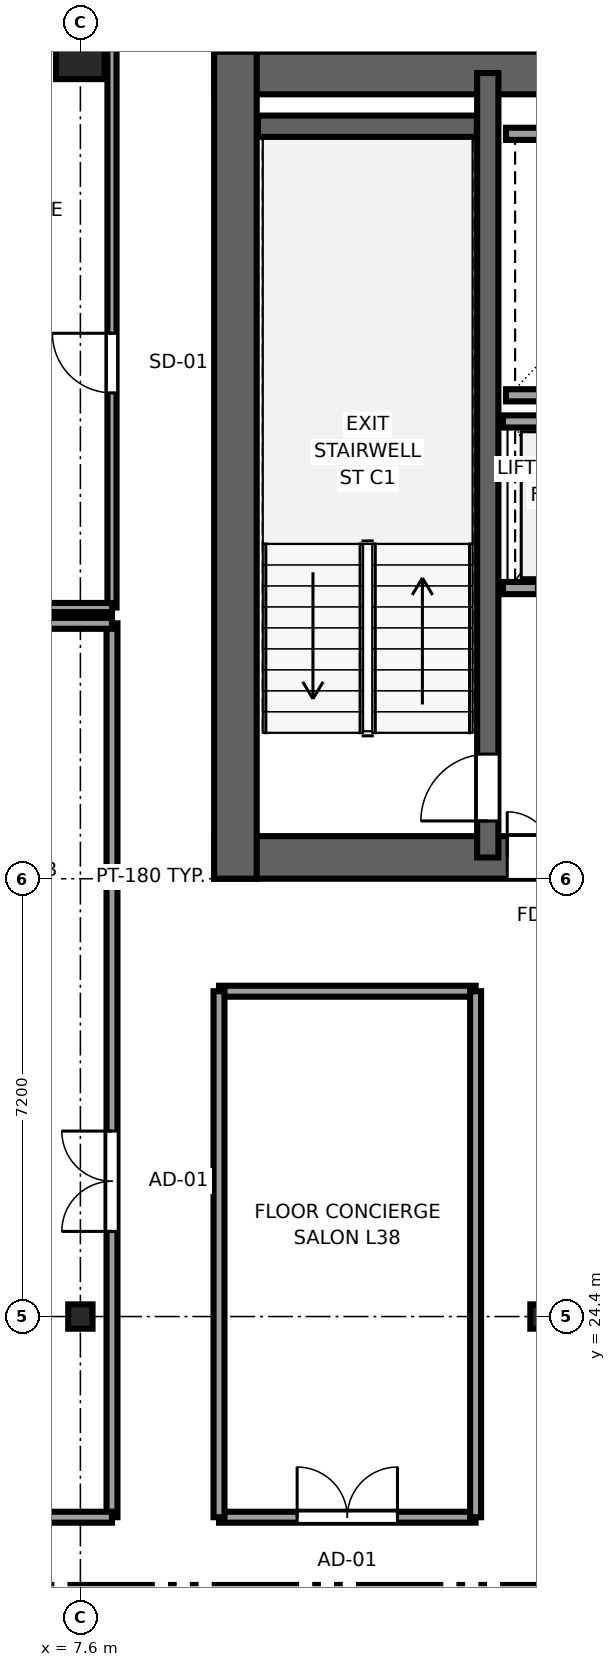
"""IFC4 building model, lengths in metres.
Left out: names, types, materials, properties, quantities, classifications, styles, units other than length and angle.
Written with IfcOpenShell. Run it as: python <this file> out.ifc"""

import sys

from ifc_helpers import new_model, si_unit, direction, frame, frame_2d, origin, origin_2d, place, context, subcontext, project, spatial, rectangle, i_section, extrude, source, transform, mapped, element, fill, save


model = new_model("IFC4")
c1 = context("Model", 3, precision=1e-05, world=origin(), true_north=direction((0.0, 1.0)))
c2 = subcontext(c1, "Body", "Model", "MODEL_VIEW")
j1 = project(units=[si_unit("LENGTHUNIT", "METRE"), si_unit("PLANEANGLEUNIT", "RADIAN")], contexts=[c1])
p1 = place(None, origin())
s1 = spatial("IfcSite", under=j1, at=p1, CompositionType="ELEMENT")
p2 = place(p1, origin())
s2 = spatial("IfcBuilding", under=s1, at=p2, CompositionType="ELEMENT")
p3 = place(p2, frame((0.0, 0.0, 147.05)))
s3 = spatial("IfcBuildingStorey", under=s2, at=p3, CompositionType="ELEMENT", Elevation=147.05)
p4 = place(p3, frame((9.8, 31.95, 0.0), z_axis=(0.0, 0.0, 1.0), x_axis=(1.0, 0.0, 0.0)))
e1 = element("IfcWall", 1, at=p4, inside=s3, PredefinedType="SHEAR", context=c2, shape_type="SweptSolid", body=[
    extrude(rectangle(XDim=26.4, YDim=0.7, at=frame_2d((13.2, 0.0))), origin(), (0.0, 0.0, 1.0), 3.55),
])
p5 = place(p4, frame((6.32, 0.0, 0.0), z_axis=(0.0, 0.0, 1.0), x_axis=(-1.0, 0.0, 0.0)))
e2 = element("IfcOpeningElement", 2, at=p5, cuts=e1, PredefinedType="OPENING", context=c2, shape_type="SweptSolid", body=[
    extrude(rectangle(XDim=1.5, YDim=2.04, at=frame_2d((0.75, 1.02))), frame((0.0, 0.36, 0.0), z_axis=(0.0, -1.0, 0.0), x_axis=(1.0, 0.0, 0.0)), (0.0, 0.0, 1.0), 0.72),
])
p6 = place(p4, frame((13.95, 0.0, 0.0), z_axis=(0.0, 0.0, 1.0), x_axis=(-1.0, 0.0, 0.0)))
e3 = element("IfcOpeningElement", 3, at=p6, cuts=e1, PredefinedType="OPENING", context=c2, shape_type="SweptSolid", body=[
    extrude(rectangle(XDim=1.5, YDim=2.04, at=frame_2d((0.75, 1.02))), frame((0.0, 0.36, 0.0), z_axis=(0.0, -1.0, 0.0), x_axis=(1.0, 0.0, 0.0)), (0.0, 0.0, 1.0), 0.72),
])
p7 = place(p4, frame((21.58, 0.0, 0.0), z_axis=(0.0, 0.0, 1.0), x_axis=(-1.0, 0.0, 0.0)))
e4 = element("IfcOpeningElement", 4, at=p7, cuts=e1, PredefinedType="OPENING", context=c2, shape_type="SweptSolid", body=[
    extrude(rectangle(XDim=1.5, YDim=2.04, at=frame_2d((0.75, 1.02))), frame((0.0, 0.36, 0.0), z_axis=(0.0, -1.0, 0.0), x_axis=(1.0, 0.0, 0.0)), (0.0, 0.0, 1.0), 0.72),
])
p8 = place(p4, frame((8.37, 0.0, 0.0), z_axis=(0.0, 0.0, 1.0), x_axis=(-1.0, 0.0, 0.0)))
e5 = element("IfcOpeningElement", 5, at=p8, cuts=e1, PredefinedType="OPENING", context=c2, shape_type="SweptSolid", body=[
    extrude(rectangle(XDim=0.82, YDim=2.01, at=frame_2d((0.41, 1.005))), frame((0.0, 0.36, 0.0), z_axis=(0.0, -1.0, 0.0), x_axis=(1.0, 0.0, 0.0)), (0.0, 0.0, 1.0), 0.72),
])
p9 = place(p4, frame((18.87, 0.0, 0.0), z_axis=(0.0, 0.0, 1.0), x_axis=(-1.0, 0.0, 0.0)))
e6 = element("IfcOpeningElement", 6, at=p9, cuts=e1, PredefinedType="OPENING", context=c2, shape_type="SweptSolid", body=[
    extrude(rectangle(XDim=0.82, YDim=2.01, at=frame_2d((0.41, 1.005))), frame((0.0, 0.36, 0.0), z_axis=(0.0, -1.0, 0.0), x_axis=(1.0, 0.0, 0.0)), (0.0, 0.0, 1.0), 0.72),
])
p10 = place(p3, frame((9.8, 44.85, 0.0), z_axis=(0.0, 0.0, 1.0), x_axis=(1.0, 0.0, 0.0)))
e7 = element("IfcWall", 7, at=p10, inside=s3, PredefinedType="SHEAR", context=c2, shape_type="SweptSolid", body=[
    extrude(rectangle(XDim=26.4, YDim=0.7, at=frame_2d((13.2, 0.0))), origin(), (0.0, 0.0, 1.0), 3.55),
])
p11 = place(p3, frame((10.15, 31.6, 0.0), z_axis=(0.0, 0.0, 1.0), x_axis=(0.0, 1.0, 0.0)))
e8 = element("IfcWall", 8, at=p11, inside=s3, PredefinedType="SHEAR", context=c2, shape_type="SweptSolid", body=[
    extrude(rectangle(XDim=13.6, YDim=0.7, at=frame_2d((6.8, 0.0))), origin(), (0.0, 0.0, 1.0), 3.55),
])
p12 = place(p3, frame((14.3, 31.95, 0.0), z_axis=(0.0, 0.0, 1.0), x_axis=(0.0, 1.0, 0.0)))
e9 = element("IfcWall", 9, at=p12, inside=s3, PredefinedType="SHEAR", context=c2, shape_type="SweptSolid", body=[
    extrude(rectangle(XDim=12.9, YDim=0.35, at=frame_2d((6.45, 0.0))), origin(), (0.0, 0.0, 1.0), 3.55),
])
p13 = place(p12, frame((0.6, 0.0, 0.0)))
e10 = element("IfcOpeningElement", 10, at=p13, cuts=e9, PredefinedType="OPENING", context=c2, shape_type="SweptSolid", body=[
    extrude(rectangle(XDim=1.1, YDim=2.12, at=frame_2d((0.55, 1.06))), frame((0.0, 0.185, 0.0), z_axis=(0.0, -1.0, 0.0), x_axis=(1.0, 0.0, 0.0)), (0.0, 0.0, 1.0), 0.37),
])
p14 = place(p3, frame((10.52, 43.975, 0.0), z_axis=(0.0, 0.0, 1.0), x_axis=(1.0, 0.0, 0.0)))
e11 = element("IfcWall", 11, at=p14, inside=s3, PredefinedType="SHEAR", context=c2, shape_type="SweptSolid", body=[
    extrude(rectangle(XDim=3.6, YDim=0.35, at=frame_2d((1.8, 0.0))), origin(), (0.0, 0.0, 1.0), 3.55),
])
m1 = source(origin(), c2, "Body", "SweptSolid", [
    extrude(i_section(OverallWidth=0.4, OverallDepth=0.4, WebThickness=0.02, FlangeThickness=0.035, at=origin_2d()), origin(), (0.0, 0.0, 1.0), 3.55),
])
for number, where, z_axis, x_axis in (
    (12, (7.6, 24.4, 0.0), (0.0, 0.0, 1.0), (1.0, 0.0, 0.0)),
    (13, (15.2, 24.4, 0.0), (0.0, 0.0, 1.0), (1.0, 0.0, 0.0)),
):
    element("IfcColumn", number, at=place(p3, frame(where, z_axis=z_axis, x_axis=x_axis)), inside=s3, PredefinedType="COLUMN", context=c2, shape_type="MappedRepresentation", body=[
        mapped(m1, transform((0.0, 0.0, 0.0), x_axis=(1.0, 0.0, 0.0), y_axis=(0.0, 1.0, 0.0), z_axis=(0.0, 0.0, 1.0), scale=1.0)),
    ])
m2 = source(origin(), c2, "Body", "SweptSolid", [
    extrude(rectangle(XDim=0.8, YDim=0.8, at=origin_2d()), origin(), (0.0, 0.0, 1.0), 3.55),
])
p15 = place(p3, frame((7.6, 45.15, 0.0), z_axis=(0.0, 0.0, 1.0), x_axis=(1.0, 0.0, 0.0)))
e14 = element("IfcColumn", 14, at=p15, inside=s3, PredefinedType="COLUMN", context=c2, shape_type="MappedRepresentation", body=[
    mapped(m2, transform((0.0, 0.0, 0.0), x_axis=(1.0, 0.0, 0.0), y_axis=(0.0, 1.0, 0.0), z_axis=(0.0, 0.0, 1.0), scale=1.0)),
])
for number, where, z_axis, x_axis in (
    (15, (14.6, 39.55, 0.0), (0.0, 0.0, 1.0), (1.0, 0.0, 0.0)),
    (16, (14.6, 43.85, 0.0), (0.0, 0.0, 1.0), (1.0, 0.0, 0.0)),
):
    element("IfcWall", number, at=place(p3, frame(where, z_axis=z_axis, x_axis=x_axis)), inside=s3, PredefinedType="SOLIDWALL", context=c2, shape_type="SweptSolid", body=[
        extrude(rectangle(XDim=4.1, YDim=0.2, at=frame_2d((2.05, 0.0))), origin(), (0.0, 0.0, 1.0), 3.37),
    ])
p16 = place(p3, frame((14.55, 36.38, 0.0), z_axis=(0.0, 0.0, 1.0), x_axis=(1.0, 0.0, 0.0)))
e17 = element("IfcWall", 17, at=p16, inside=s3, PredefinedType="SOLIDWALL", context=c2, shape_type="SweptSolid", body=[
    extrude(rectangle(XDim=4.075, YDim=0.2, at=frame_2d((2.038, 0.0))), origin(), (0.0, 0.0, 1.0), 3.37),
])
p17 = place(p16, frame((0.55, 0.0, 0.0)))
e18 = element("IfcOpeningElement", 18, at=p17, cuts=e17, PredefinedType="OPENING", context=c2, shape_type="SweptSolid", body=[
    extrude(rectangle(XDim=1.1, YDim=2.12, at=frame_2d((0.55, 1.06))), frame((0.0, 0.11, 0.0), z_axis=(0.0, -1.0, 0.0), x_axis=(1.0, 0.0, 0.0)), (0.0, 0.0, 1.0), 0.22),
])
p18 = place(p16, frame((2.45, 0.0, 0.0)))
e19 = element("IfcOpeningElement", 19, at=p18, cuts=e17, PredefinedType="OPENING", context=c2, shape_type="SweptSolid", body=[
    extrude(rectangle(XDim=1.1, YDim=2.12, at=frame_2d((0.55, 1.06))), frame((0.0, 0.11, 0.0), z_axis=(0.0, -1.0, 0.0), x_axis=(1.0, 0.0, 0.0)), (0.0, 0.0, 1.0), 0.22),
])
p19 = place(p3, frame((14.55, 39.12, 0.0), z_axis=(0.0, 0.0, 1.0), x_axis=(1.0, 0.0, 0.0)))
e20 = element("IfcWall", 20, at=p19, inside=s3, PredefinedType="SOLIDWALL", context=c2, shape_type="SweptSolid", body=[
    extrude(rectangle(XDim=4.075, YDim=0.2, at=frame_2d((2.038, 0.0))), origin(), (0.0, 0.0, 1.0), 3.37),
])
p20 = place(p3, frame((8.12, 21.1, 0.0), z_axis=(0.0, 0.0, 1.0), x_axis=(0.0, 1.0, 0.0)))
e21 = element("IfcWall", 21, at=p20, inside=s3, PredefinedType="PARTITIONING", context=c2, shape_type="SweptSolid", body=[
    extrude(rectangle(XDim=14.7, YDim=0.18, at=frame_2d((7.35, 0.0))), origin(), (0.0, 0.0, 1.0), 3.37),
])
p21 = place(p20, frame((4.7, 0.0, 0.0)))
e22 = element("IfcOpeningElement", 22, at=p21, cuts=e21, PredefinedType="OPENING", context=c2, shape_type="SweptSolid", body=[
    extrude(rectangle(XDim=1.65, YDim=2.15, at=frame_2d((0.825, 1.075))), frame((0.0, 0.1, 0.0), z_axis=(0.0, -1.0, 0.0), x_axis=(1.0, 0.0, 0.0)), (0.0, 0.0, 1.0), 0.2),
])
for number, where, z_axis, x_axis in (
    (23, (3.005, 21.1, 0.0), (0.0, 0.0, 1.0), (1.0, 0.0, 0.0)),
    (24, (3.005, 35.8, 0.0), (0.0, 0.0, 1.0), (1.0, 0.0, 0.0)),
):
    element("IfcWall", number, at=place(p3, frame(where, z_axis=z_axis, x_axis=x_axis)), inside=s3, PredefinedType="PARTITIONING", context=c2, shape_type="SweptSolid", body=[
        extrude(rectangle(XDim=5.115, YDim=0.18, at=frame_2d((2.558, 0.0))), origin(), (0.0, 0.0, 1.0), 3.37),
    ])
p22 = place(p3, frame((8.12, 36.06, 0.0), z_axis=(0.0, 0.0, 1.0), x_axis=(0.0, 1.0, 0.0)))
e25 = element("IfcWall", 25, at=p22, inside=s3, PredefinedType="PARTITIONING", context=c2, shape_type="SweptSolid", body=[
    extrude(rectangle(XDim=9.535, YDim=0.15, at=frame_2d((4.768, 0.0))), origin(), (0.0, 0.0, 1.0), 3.37),
])
p23 = place(p22, frame((3.53, 0.0, 0.0)))
e26 = element("IfcOpeningElement", 26, at=p23, cuts=e25, PredefinedType="OPENING", context=c2, shape_type="SweptSolid", body=[
    extrude(rectangle(XDim=0.98, YDim=2.12, at=frame_2d((0.49, 1.06))), frame((0.0, 0.085, 0.0), z_axis=(0.0, -1.0, 0.0), x_axis=(1.0, 0.0, 0.0)), (0.0, 0.0, 1.0), 0.17),
])
p24 = place(p3, frame((5.07, 36.06, 0.0), z_axis=(0.0, 0.0, 1.0), x_axis=(1.0, 0.0, 0.0)))
e27 = element("IfcWall", 27, at=p24, inside=s3, PredefinedType="PARTITIONING", context=c2, shape_type="SweptSolid", body=[
    extrude(rectangle(XDim=3.05, YDim=0.15, at=frame_2d((1.525, 0.0))), origin(), (0.0, 0.0, 1.0), 3.37),
])
p25 = place(p3, frame((9.88, 21.1, 0.0), z_axis=(0.0, 0.0, 1.0), x_axis=(1.0, 0.0, 0.0)))
e28 = element("IfcWall", 28, at=p25, inside=s3, PredefinedType="PARTITIONING", context=c2, shape_type="SweptSolid", body=[
    extrude(rectangle(XDim=4.22, YDim=0.18, at=frame_2d((2.11, 0.0))), origin(), (0.0, 0.0, 1.0), 3.37),
])
p26 = place(p25, frame((1.285, 0.0, 0.0)))
e29 = element("IfcOpeningElement", 29, at=p26, cuts=e28, PredefinedType="OPENING", context=c2, shape_type="SweptSolid", body=[
    extrude(rectangle(XDim=1.65, YDim=2.15, at=frame_2d((0.825, 1.075))), frame((0.0, 0.1, 0.0), z_axis=(0.0, -1.0, 0.0), x_axis=(1.0, 0.0, 0.0)), (0.0, 0.0, 1.0), 0.2),
])
p27 = place(p3, frame((9.88, 29.75, 0.0), z_axis=(0.0, 0.0, 1.0), x_axis=(1.0, 0.0, 0.0)))
e30 = element("IfcWall", 30, at=p27, inside=s3, PredefinedType="PARTITIONING", context=c2, shape_type="SweptSolid", body=[
    extrude(rectangle(XDim=4.22, YDim=0.18, at=frame_2d((2.11, 0.0))), origin(), (0.0, 0.0, 1.0), 3.37),
])
for number, where, z_axis, x_axis in (
    (31, (9.88, 21.1, 0.0), (0.0, 0.0, 1.0), (0.0, 1.0, 0.0)),
    (32, (14.1, 21.1, 0.0), (0.0, 0.0, 1.0), (0.0, 1.0, 0.0)),
):
    element("IfcWall", number, at=place(p3, frame(where, z_axis=z_axis, x_axis=x_axis)), inside=s3, PredefinedType="PARTITIONING", context=c2, shape_type="SweptSolid", body=[
        extrude(rectangle(XDim=8.65, YDim=0.18, at=frame_2d((4.325, 0.0))), origin(), (0.0, 0.0, 1.0), 3.37),
    ])
m3 = source(origin(), c2, "Body", "SweptSolid", [
    extrude(rectangle(XDim=1.1, YDim=2.12, at=frame_2d((0.55, 1.06))), frame((0.0, 0.025, 0.0), z_axis=(0.0, -1.0, 0.0), x_axis=(1.0, 0.0, 0.0)), (0.0, 0.0, 1.0), 0.05),
])
p28 = place(p13, origin())
e33 = element("IfcDoor", 33, at=p28, inside=s3, OperationType="SINGLE_SWING_LEFT", PredefinedType="DOOR", context=c2, shape_type="MappedRepresentation", body=[
    mapped(m3, transform((0.0, 0.0, 0.0), x_axis=(1.0, 0.0, 0.0), y_axis=(0.0, 1.0, 0.0), z_axis=(0.0, 0.0, 1.0), scale=1.0)),
])
fill(e10, e33)
m4 = source(origin(), c2, "Body", "SweptSolid", [
    extrude(rectangle(XDim=1.5, YDim=2.04, at=frame_2d((0.75, 1.02))), frame((0.0, 0.025, 0.0), z_axis=(0.0, -1.0, 0.0), x_axis=(1.0, 0.0, 0.0)), (0.0, 0.0, 1.0), 0.05),
])
p29 = place(p5, origin())
e34 = element("IfcDoor", 34, at=p29, inside=s3, OperationType="DOUBLE_DOOR_SINGLE_SWING", PredefinedType="DOOR", context=c2, shape_type="MappedRepresentation", body=[
    mapped(m4, transform((0.0, 0.0, 0.0), x_axis=(1.0, 0.0, 0.0), y_axis=(0.0, 1.0, 0.0), z_axis=(0.0, 0.0, 1.0), scale=1.0)),
])
fill(e2, e34)
m5 = source(origin(), c2, "Body", "SweptSolid", [
    extrude(rectangle(XDim=1.65, YDim=2.15, at=frame_2d((0.825, 1.075))), frame((0.0, 0.025, 0.0), z_axis=(0.0, -1.0, 0.0), x_axis=(1.0, 0.0, 0.0)), (0.0, 0.0, 1.0), 0.05),
])
p30 = place(p21, origin())
e35 = element("IfcDoor", 35, at=p30, inside=s3, OperationType="DOUBLE_DOOR_SINGLE_SWING", PredefinedType="DOOR", context=c2, shape_type="MappedRepresentation", body=[
    mapped(m5, transform((0.0, 0.0, 0.0), x_axis=(1.0, 0.0, 0.0), y_axis=(0.0, 1.0, 0.0), z_axis=(0.0, 0.0, 1.0), scale=1.0)),
])
fill(e22, e35)
m6 = source(origin(), c2, "Body", "SweptSolid", [
    extrude(rectangle(XDim=0.98, YDim=2.12, at=frame_2d((0.49, 1.06))), frame((0.0, 0.025, 0.0), z_axis=(0.0, -1.0, 0.0), x_axis=(1.0, 0.0, 0.0)), (0.0, 0.0, 1.0), 0.05),
])
p31 = place(p23, origin())
e36 = element("IfcDoor", 36, at=p31, inside=s3, OperationType="SINGLE_SWING_RIGHT", PredefinedType="DOOR", context=c2, shape_type="MappedRepresentation", body=[
    mapped(m6, transform((0.0, 0.0, 0.0), x_axis=(1.0, 0.0, 0.0), y_axis=(0.0, 1.0, 0.0), z_axis=(0.0, 0.0, 1.0), scale=1.0)),
])
fill(e26, e36)
p32 = place(p26, origin())
e37 = element("IfcDoor", 37, at=p32, inside=s3, OperationType="DOUBLE_DOOR_SINGLE_SWING", PredefinedType="DOOR", context=c2, shape_type="MappedRepresentation", body=[
    mapped(m5, transform((0.0, 0.0, 0.0), x_axis=(1.0, 0.0, 0.0), y_axis=(0.0, 1.0, 0.0), z_axis=(0.0, 0.0, 1.0), scale=1.0)),
])
fill(e29, e37)
save(model, sys.argv[1])
